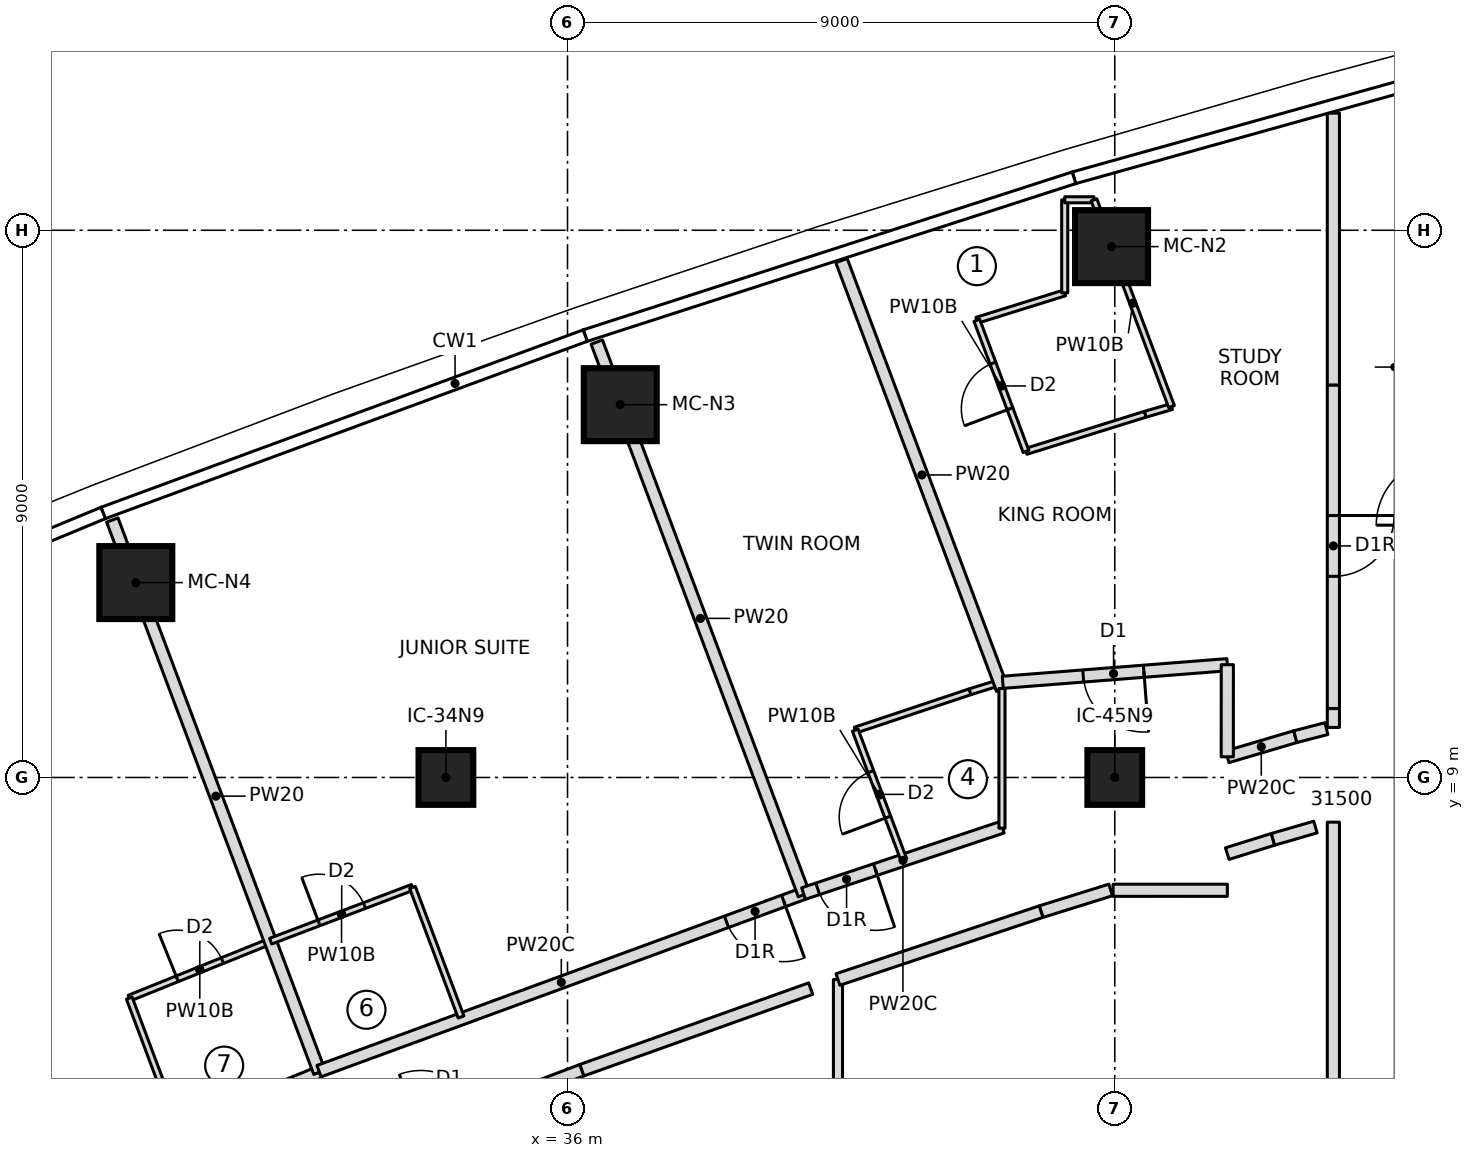
"""IFC4 building model, lengths in metres.
Left out: names, types, materials, properties, quantities, classifications, styles, units other than length and angle.
Written with IfcOpenShell. Run it as: python <this file> out.ifc"""

import sys

from ifc_helpers import new_model, si_unit, direction, frame, frame_2d, origin, origin_2d, place, context, subcontext, project, spatial, rectangle, extrude, element, fill, save


model = new_model("IFC4")
c1 = context("Model", 3, precision=1e-05, world=origin(), true_north=direction((0.0, 1.0)))
c2 = subcontext(c1, "Body", "Model", "MODEL_VIEW")
j1 = project(units=[si_unit("LENGTHUNIT", "METRE"), si_unit("PLANEANGLEUNIT", "RADIAN")], contexts=[c1])
p1 = place(None, origin())
s1 = spatial("IfcSite", under=j1, at=p1, CompositionType="ELEMENT")
p2 = place(p1, origin())
s2 = spatial("IfcBuilding", under=s1, at=p2, CompositionType="ELEMENT")
p3 = place(p2, frame((0.0, 0.0, 220.8)))
s3 = spatial("IfcBuildingStorey", under=s2, at=p3, CompositionType="ELEMENT", Elevation=220.8)
for number, where, z_axis, x_axis in (
    (1, (44.947, 17.731, 0.0), (0.0, 0.0, 1.0), (1.0, 0.0, 0.0)),
    (2, (36.867, 15.132, 0.0), (0.0, 0.0, 1.0), (1.0, 0.0, 0.0)),
    (3, (28.9, 12.205, 0.0), (0.0, 0.0, 1.0), (1.0, 0.0, 0.0)),
):
    element("IfcColumn", number, at=place(p3, frame(where, z_axis=z_axis, x_axis=x_axis)), inside=s3, PredefinedType="COLUMN", context=c2, shape_type="SweptSolid", body=[
        extrude(rectangle(XDim=1.2, YDim=1.2, at=origin_2d()), origin(), (0.0, 0.0, 1.0), 3.55),
    ])
for number, where, z_axis, x_axis in (
    (4, (34.0, 9.0, 0.0), (0.0, 0.0, 1.0), (1.0, 0.0, 0.0)),
    (5, (45.0, 9.0, 0.0), (0.0, 0.0, 1.0), (1.0, 0.0, 0.0)),
):
    element("IfcColumn", number, at=place(p3, frame(where, z_axis=z_axis, x_axis=x_axis)), inside=s3, PredefinedType="COLUMN", context=c2, shape_type="SweptSolid", body=[
        extrude(rectangle(XDim=0.9, YDim=0.9, at=origin_2d()), origin(), (0.0, 0.0, 1.0), 3.55),
    ])
p4 = place(p3, frame((26.266, 1.85, 0.0), z_axis=(0.0, 0.0, 1.0), x_axis=(0.926231512449, 0.376955150311, 0.0)))
e6 = element("IfcWall", 6, at=p4, inside=s3, PredefinedType="PARTITIONING", context=c2, shape_type="SweptSolid", body=[
    extrude(rectangle(XDim=6.105, YDim=0.2, at=frame_2d((3.052, 0.0))), origin(), (0.0, 0.0, 1.0), 3.25),
])
p5 = place(p4, frame((0.35, 0.0, 0.0)))
e7 = element("IfcOpeningElement", 7, at=p5, cuts=e6, PredefinedType="OPENING", context=c2, shape_type="SweptSolid", body=[
    extrude(rectangle(XDim=1.0, YDim=2.1, at=frame_2d((0.5, 1.05))), frame((0.0, 0.11, 0.0), z_axis=(0.0, -1.0, 0.0), x_axis=(1.0, 0.0, 0.0)), (0.0, 0.0, 1.0), 0.22),
])
p6 = place(p3, frame((28.793, 5.372, 0.0), z_axis=(0.0, 0.0, 1.0), x_axis=(0.92761232595, 0.373544338394, 0.0)))
e8 = element("IfcWall", 8, at=p6, inside=s3, PredefinedType="PARTITIONING", context=c2, shape_type="SweptSolid", body=[
    extrude(rectangle(XDim=2.5, YDim=0.1, at=frame_2d((1.25, 0.0))), origin(), (0.0, 0.0, 1.0), 3.25),
])
p7 = place(p6, frame((0.85, 0.0, 0.0)))
e9 = element("IfcOpeningElement", 9, at=p7, cuts=e8, PredefinedType="OPENING", context=c2, shape_type="SweptSolid", body=[
    extrude(rectangle(XDim=0.8, YDim=2.1, at=frame_2d((0.4, 1.05))), frame((0.0, 0.06, 0.0), z_axis=(0.0, -1.0, 0.0), x_axis=(1.0, 0.0, 0.0)), (0.0, 0.0, 1.0), 0.12),
])
p8 = place(p3, frame((29.593, 3.239, 0.0), z_axis=(0.0, 0.0, 1.0), x_axis=(-0.351158682313, 0.936315961541, 0.0)))
e10 = element("IfcWall", 10, at=p8, inside=s3, PredefinedType="PARTITIONING", context=c2, shape_type="SweptSolid", body=[
    extrude(rectangle(XDim=2.278, YDim=0.1, at=frame_2d((1.139, 0.0))), origin(), (0.0, 0.0, 1.0), 3.25),
])
p9 = place(p3, frame((31.92, 4.151, 0.0), z_axis=(0.0, 0.0, 1.0), x_axis=(-0.351126199585, 0.936328143316, 0.0)))
e11 = element("IfcWall", 11, at=p9, inside=s3, PredefinedType="PARTITIONING", context=c2, shape_type="SweptSolid", body=[
    extrude(rectangle(XDim=9.701, YDim=0.2, at=frame_2d((4.851, 0.0))), origin(), (0.0, 0.0, 1.0), 3.25),
])
p10 = place(p3, frame((39.882, 7.091, 0.0), z_axis=(0.0, 0.0, 1.0), x_axis=(-0.938916907106, -0.344143925634, 0.0)))
e12 = element("IfcWall", 12, at=p10, inside=s3, PredefinedType="PARTITIONING", context=c2, shape_type="SweptSolid", body=[
    extrude(rectangle(XDim=8.488, YDim=0.2, at=frame_2d((4.244, 0.0))), origin(), (0.0, 0.0, 1.0), 3.25),
])
p11 = place(p10, frame((0.35, 0.0, 0.0)))
e13 = element("IfcOpeningElement", 13, at=p11, cuts=e12, PredefinedType="OPENING", context=c2, shape_type="SweptSolid", body=[
    extrude(rectangle(XDim=1.0, YDim=2.1, at=frame_2d((0.5, 1.05))), frame((0.0, 0.11, 0.0), z_axis=(0.0, -1.0, 0.0), x_axis=(1.0, 0.0, 0.0)), (0.0, 0.0, 1.0), 0.22),
])
p12 = place(p3, frame((31.117, 6.308, 0.0), z_axis=(0.0, 0.0, 1.0), x_axis=(0.93495051617, 0.354778145202, 0.0)))
e14 = element("IfcWall", 14, at=p12, inside=s3, PredefinedType="PARTITIONING", context=c2, shape_type="SweptSolid", body=[
    extrude(rectangle(XDim=2.495, YDim=0.1, at=frame_2d((1.247, 0.0))), origin(), (0.0, 0.0, 1.0), 3.25),
])
p13 = place(p12, frame((0.85, 0.0, 0.0)))
e15 = element("IfcOpeningElement", 15, at=p13, cuts=e14, PredefinedType="OPENING", context=c2, shape_type="SweptSolid", body=[
    extrude(rectangle(XDim=0.8, YDim=2.1, at=frame_2d((0.4, 1.05))), frame((0.0, 0.06, 0.0), z_axis=(0.0, -1.0, 0.0), x_axis=(1.0, 0.0, 0.0)), (0.0, 0.0, 1.0), 0.12),
])
p14 = place(p3, frame((33.45, 7.193, 0.0), z_axis=(0.0, 0.0, 1.0), x_axis=(0.351135191353, -0.936324771323, 0.0)))
e16 = element("IfcWall", 16, at=p14, inside=s3, PredefinedType="PARTITIONING", context=c2, shape_type="SweptSolid", body=[
    extrude(rectangle(XDim=2.277, YDim=0.1, at=frame_2d((1.139, 0.0))), origin(), (0.0, 0.0, 1.0), 3.25),
])
p15 = place(p3, frame((39.889, 7.072, 0.0), z_axis=(0.0, 0.0, 1.0), x_axis=(-0.35112895446, 0.936327110224, 0.0)))
e17 = element("IfcWall", 17, at=p15, inside=s3, PredefinedType="PARTITIONING", context=c2, shape_type="SweptSolid", body=[
    extrude(rectangle(XDim=9.706, YDim=0.2, at=frame_2d((4.853, 0.0))), origin(), (0.0, 0.0, 1.0), 3.25),
])
p16 = place(p3, frame((43.15, 8.183, 0.0), z_axis=(0.0, 0.0, 1.0), x_axis=(-0.948477584784, -0.316844238013, 0.0)))
e18 = element("IfcWall", 18, at=p16, inside=s3, PredefinedType="PARTITIONING", context=c2, shape_type="SweptSolid", body=[
    extrude(rectangle(XDim=3.445, YDim=0.2, at=frame_2d((1.723, 0.0))), origin(), (0.0, 0.0, 1.0), 3.25),
])
p17 = place(p16, frame((2.2, 0.0, 0.0)))
e19 = element("IfcOpeningElement", 19, at=p17, cuts=e18, PredefinedType="OPENING", context=c2, shape_type="SweptSolid", body=[
    extrude(rectangle(XDim=1.0, YDim=2.1, at=frame_2d((0.5, 1.05))), frame((0.0, 0.11, 0.0), z_axis=(0.0, -1.0, 0.0), x_axis=(1.0, 0.0, 0.0)), (0.0, 0.0, 1.0), 0.22),
])
p18 = place(p3, frame((40.732, 9.779, 0.0), z_axis=(0.0, 0.0, 1.0), x_axis=(0.948499248693, 0.316779379426, 0.0)))
e20 = element("IfcWall", 20, at=p18, inside=s3, PredefinedType="PARTITIONING", context=c2, shape_type="SweptSolid", body=[
    extrude(rectangle(XDim=1.991, YDim=0.1, at=frame_2d((0.996, 0.0))), origin(), (0.0, 0.0, 1.0), 3.25),
])
p19 = place(p3, frame((42.621, 10.409, 0.0), z_axis=(0.0, 0.0, 1.0), x_axis=(0.954624465478, 0.297812239356, 0.0)))
e21 = element("IfcWall", 21, at=p19, inside=s3, PredefinedType="PARTITIONING", context=c2, shape_type="SweptSolid", body=[
    extrude(rectangle(XDim=0.511, YDim=0.1, at=frame_2d((0.255, 0.0))), origin(), (0.0, 0.0, 1.0), 3.25),
])
p20 = place(p3, frame((41.532, 7.645, 0.0), z_axis=(0.0, 0.0, 1.0), x_axis=(-0.351146927505, 0.936320370014, 0.0)))
e22 = element("IfcWall", 22, at=p20, inside=s3, PredefinedType="PARTITIONING", context=c2, shape_type="SweptSolid", body=[
    extrude(rectangle(XDim=2.278, YDim=0.1, at=frame_2d((1.139, 0.0))), origin(), (0.0, 0.0, 1.0), 3.25),
])
p21 = place(p20, frame((0.75, 0.0, 0.0)))
e23 = element("IfcOpeningElement", 23, at=p21, cuts=e22, PredefinedType="OPENING", context=c2, shape_type="SweptSolid", body=[
    extrude(rectangle(XDim=0.8, YDim=2.1, at=frame_2d((0.4, 1.05))), frame((0.0, 0.06, 0.0), z_axis=(0.0, -1.0, 0.0), x_axis=(1.0, 0.0, 0.0)), (0.0, 0.0, 1.0), 0.12),
])
p22 = place(p3, frame((43.15, 10.45, 0.0), z_axis=(0.0, 0.0, 1.0), x_axis=(-0.351119888923, 0.936330509811, 0.0)))
e24 = element("IfcWall", 24, at=p22, inside=s3, PredefinedType="PARTITIONING", context=c2, shape_type="SweptSolid", body=[
    extrude(rectangle(XDim=7.531, YDim=0.2, at=frame_2d((3.766, 0.0))), origin(), (0.0, 0.0, 1.0), 3.25),
])
p23 = place(p3, frame((47.969, 9.671, 0.0), z_axis=(0.0, 0.0, 1.0), x_axis=(-0.958867721668, -0.283853293696, 0.0)))
e25 = element("IfcWall", 25, at=p23, inside=s3, PredefinedType="PARTITIONING", context=c2, shape_type="SweptSolid", body=[
    extrude(rectangle(XDim=1.167, YDim=0.2, at=frame_2d((0.583, 0.0))), origin(), (0.0, 0.0, 1.0), 3.25),
])
p24 = place(p3, frame((42.731, 16.519, 0.0), z_axis=(0.0, 0.0, 1.0), x_axis=(0.954631901927, 0.297788401091, 0.0)))
e26 = element("IfcWall", 26, at=p24, inside=s3, PredefinedType="PARTITIONING", context=c2, shape_type="SweptSolid", body=[
    extrude(rectangle(XDim=1.514, YDim=0.1, at=frame_2d((0.757, 0.0))), origin(), (0.0, 0.0, 1.0), 3.25),
])
p25 = place(p3, frame((44.177, 16.97, 0.0), z_axis=(0.0, 0.0, 1.0), x_axis=(0.0, 1.0, 0.0)))
e27 = element("IfcWall", 27, at=p25, inside=s3, PredefinedType="PARTITIONING", context=c2, shape_type="SweptSolid", body=[
    extrude(rectangle(XDim=1.531, YDim=0.1, at=frame_2d((0.766, 0.0))), origin(), (0.0, 0.0, 1.0), 3.25),
])
p26 = place(p3, frame((44.177, 18.501, 0.0), z_axis=(0.0, 0.0, 1.0), x_axis=(1.0, 0.0, 0.0)))
e28 = element("IfcWall", 28, at=p26, inside=s3, PredefinedType="PARTITIONING", context=c2, shape_type="SweptSolid", body=[
    extrude(rectangle(XDim=0.481, YDim=0.1, at=frame_2d((0.241, 0.0))), origin(), (0.0, 0.0, 1.0), 3.25),
])
p27 = place(p3, frame((45.934, 15.099, 0.0), z_axis=(0.0, 0.0, 1.0), x_axis=(-0.960560469191, -0.278071186978, 0.0)))
e29 = element("IfcWall", 29, at=p27, inside=s3, PredefinedType="PARTITIONING", context=c2, shape_type="SweptSolid", body=[
    extrude(rectangle(XDim=0.452, YDim=0.1, at=frame_2d((0.226, 0.0))), origin(), (0.0, 0.0, 1.0), 3.25),
])
p28 = place(p3, frame((45.499, 14.973, 0.0), z_axis=(0.0, 0.0, 1.0), x_axis=(-0.954642821531, -0.297753393432, 0.0)))
e30 = element("IfcWall", 30, at=p28, inside=s3, PredefinedType="PARTITIONING", context=c2, shape_type="SweptSolid", body=[
    extrude(rectangle(XDim=2.052, YDim=0.1, at=frame_2d((1.026, 0.0))), origin(), (0.0, 0.0, 1.0), 3.25),
])
p29 = place(p3, frame((43.54, 14.362, 0.0), z_axis=(0.0, 0.0, 1.0), x_axis=(-0.351111827312, 0.936333532841, 0.0)))
e31 = element("IfcWall", 31, at=p29, inside=s3, PredefinedType="PARTITIONING", context=c2, shape_type="SweptSolid", body=[
    extrude(rectangle(XDim=2.304, YDim=0.1, at=frame_2d((1.152, 0.0))), origin(), (0.0, 0.0, 1.0), 3.25),
])
p30 = place(p29, frame((0.75, 0.0, 0.0)))
e32 = element("IfcOpeningElement", 32, at=p30, cuts=e31, PredefinedType="OPENING", context=c2, shape_type="SweptSolid", body=[
    extrude(rectangle(XDim=0.8, YDim=2.1, at=frame_2d((0.4, 1.05))), frame((0.0, 0.06, 0.0), z_axis=(0.0, -1.0, 0.0), x_axis=(1.0, 0.0, 0.0)), (0.0, 0.0, 1.0), 0.12),
])
p31 = place(p3, frame((35.556, 3.927, 0.0), z_axis=(0.0, 0.0, 1.0), x_axis=(0.934928414106, 0.354836385533, 0.0)))
e33 = element("IfcWall", 33, at=p31, inside=s3, PredefinedType="PARTITIONING", context=c2, shape_type="SweptSolid", body=[
    extrude(rectangle(XDim=0.727, YDim=0.2, at=frame_2d((0.364, 0.0))), origin(), (0.0, 0.0, 1.0), 3.25),
])
p32 = place(p3, frame((36.236, 4.186, 0.0), z_axis=(0.0, 0.0, 1.0), x_axis=(0.941909090846, 0.335867927288, 0.0)))
e34 = element("IfcWall", 34, at=p32, inside=s3, PredefinedType="PARTITIONING", context=c2, shape_type="SweptSolid", body=[
    extrude(rectangle(XDim=3.995, YDim=0.2, at=frame_2d((1.998, 0.0))), origin(), (0.0, 0.0, 1.0), 3.25),
])
p33 = place(p3, frame((40.448, -5.572, 0.0), z_axis=(0.0, 0.0, 1.0), x_axis=(0.0, 1.0, 0.0)))
e35 = element("IfcWall", 35, at=p33, inside=s3, PredefinedType="PARTITIONING", context=c2, shape_type="SweptSolid", body=[
    extrude(rectangle(XDim=11.249, YDim=0.15, at=frame_2d((5.625, 0.0))), origin(), (0.0, 0.0, 1.0), 3.25),
])
p34 = place(p3, frame((43.788, 6.793, 0.0), z_axis=(0.0, 0.0, 1.0), x_axis=(0.954693570678, 0.29759063511, 0.0)))
e36 = element("IfcWall", 36, at=p34, inside=s3, PredefinedType="PARTITIONING", context=c2, shape_type="SweptSolid", body=[
    extrude(rectangle(XDim=1.198, YDim=0.2, at=frame_2d((0.599, 0.0))), origin(), (0.0, 0.0, 1.0), 3.25),
])
p35 = place(p3, frame((46.85, 7.748, 0.0), z_axis=(0.0, 0.0, 1.0), x_axis=(0.95461224237, 0.297851417181, 0.0)))
e37 = element("IfcWall", 37, at=p35, inside=s3, PredefinedType="PARTITIONING", context=c2, shape_type="SweptSolid", body=[
    extrude(rectangle(XDim=0.788, YDim=0.2, at=frame_2d((0.394, 0.0))), origin(), (0.0, 0.0, 1.0), 3.25),
])
p36 = place(p3, frame((40.448, 5.677, 0.0), z_axis=(0.0, 0.0, 1.0), x_axis=(0.948475139593, 0.316851557632, 0.0)))
e38 = element("IfcWall", 38, at=p36, inside=s3, PredefinedType="PARTITIONING", context=c2, shape_type="SweptSolid", body=[
    extrude(rectangle(XDim=3.522, YDim=0.2, at=frame_2d((1.761, 0.0))), origin(), (0.0, 0.0, 1.0), 3.25),
])
p37 = place(p3, frame((43.145, 10.463, 0.0), z_axis=(0.0, 0.0, 1.0), x_axis=(0.0, -1.0, 0.0)))
e39 = element("IfcWall", 39, at=p37, inside=s3, PredefinedType="PARTITIONING", context=c2, shape_type="SweptSolid", body=[
    extrude(rectangle(XDim=2.298, YDim=0.1, at=frame_2d((1.149, 0.0))), origin(), (0.0, 0.0, 1.0), 3.25),
])
p38 = place(p3, frame((44.658, 18.501, 0.0), z_axis=(0.0, 0.0, 1.0), x_axis=(0.351027709609, -0.936365071479, 0.0)))
e40 = element("IfcWall", 40, at=p38, inside=s3, PredefinedType="PARTITIONING", context=c2, shape_type="SweptSolid", body=[
    extrude(rectangle(XDim=3.633, YDim=0.1, at=frame_2d((1.817, 0.0))), origin(), (0.0, 0.0, 1.0), 3.25),
])
p39 = place(p3, frame((47.602, 7.982, 0.0), z_axis=(0.0, 0.0, 1.0), x_axis=(0.960439023181, 0.278490363839, 0.0)))
e41 = element("IfcWall", 41, at=p39, inside=s3, PredefinedType="PARTITIONING", context=c2, shape_type="SweptSolid", body=[
    extrude(rectangle(XDim=0.727, YDim=0.2, at=frame_2d((0.363, 0.0))), origin(), (0.0, 0.0, 1.0), 3.25),
])
p40 = place(p3, frame((48.595, 15.455, 0.0), z_axis=(0.0, 0.0, 1.0), x_axis=(0.0, -1.0, 0.0)))
e42 = element("IfcWall", 42, at=p40, inside=s3, PredefinedType="PARTITIONING", context=c2, shape_type="SweptSolid", body=[
    extrude(rectangle(XDim=5.322, YDim=0.2, at=frame_2d((2.661, 0.0))), origin(), (0.0, 0.0, 1.0), 3.25),
])
p41 = place(p40, frame((2.147, 0.0, 0.0)))
e43 = element("IfcOpeningElement", 43, at=p41, cuts=e42, PredefinedType="OPENING", context=c2, shape_type="SweptSolid", body=[
    extrude(rectangle(XDim=1.0, YDim=2.1, at=frame_2d((0.5, 1.05))), frame((0.0, 0.11, 0.0), z_axis=(0.0, -1.0, 0.0), x_axis=(1.0, 0.0, 0.0)), (0.0, 0.0, 1.0), 0.22),
])
p42 = place(p3, frame((46.851, 10.855, 0.0), z_axis=(0.0, 0.0, 1.0), x_axis=(-0.996940593543, -0.078162989617, 0.0)))
e44 = element("IfcWall", 44, at=p42, inside=s3, PredefinedType="PARTITIONING", context=c2, shape_type="SweptSolid", body=[
    extrude(rectangle(XDim=3.704, YDim=0.2, at=frame_2d((1.852, 0.0))), origin(), (0.0, 0.0, 1.0), 3.25),
])
p43 = place(p42, frame((1.377, 0.0, 0.0)))
e45 = element("IfcOpeningElement", 45, at=p43, cuts=e44, PredefinedType="OPENING", context=c2, shape_type="SweptSolid", body=[
    extrude(rectangle(XDim=1.0, YDim=2.1, at=frame_2d((0.5, 1.05))), frame((0.0, 0.11, 0.0), z_axis=(0.0, -1.0, 0.0), x_axis=(1.0, 0.0, 0.0)), (0.0, 0.0, 1.0), 0.22),
])
p44 = place(p3, frame((44.972, 7.145, 0.0), z_axis=(0.0, 0.0, 1.0), x_axis=(0.99999999156, 0.000129920747, 0.0)))
e46 = element("IfcWall", 46, at=p44, inside=s3, PredefinedType="PARTITIONING", context=c2, shape_type="SweptSolid", body=[
    extrude(rectangle(XDim=1.879, YDim=0.2, at=frame_2d((0.939, 0.0))), origin(), (0.0, 0.0, 1.0), 3.25),
])
p45 = place(p3, frame((48.595, 8.265, 0.0), z_axis=(0.0, 0.0, 1.0), x_axis=(0.0, -1.0, 0.0)))
e47 = element("IfcWall", 47, at=p45, inside=s3, PredefinedType="PARTITIONING", context=c2, shape_type="SweptSolid", body=[
    extrude(rectangle(XDim=16.53, YDim=0.2, at=frame_2d((8.265, 0.0))), origin(), (0.0, 0.0, 1.0), 3.25),
])
p46 = place(p3, frame((46.85, 9.34, 0.0), z_axis=(0.0, 0.0, 1.0), x_axis=(0.000644641284, 0.999999792219, 0.0)))
e48 = element("IfcWall", 48, at=p46, inside=s3, PredefinedType="PARTITIONING", context=c2, shape_type="SweptSolid", body=[
    extrude(rectangle(XDim=1.515, YDim=0.2, at=frame_2d((0.757, 0.0))), origin(), (0.0, 0.0, 1.0), 3.25),
])
p47 = place(p3, frame((48.595, 19.927, 0.0), z_axis=(0.0, 0.0, 1.0), x_axis=(0.0, -1.0, 0.0)))
e49 = element("IfcWall", 49, at=p47, inside=s3, PredefinedType="PARTITIONING", context=c2, shape_type="SweptSolid", body=[
    extrude(rectangle(XDim=4.472, YDim=0.2, at=frame_2d((2.236, 0.0))), origin(), (0.0, 0.0, 1.0), 3.25),
])
p48 = place(p3, frame((48.595, 10.133, 0.0), z_axis=(0.0, 0.0, 1.0), x_axis=(0.0, -1.0, 0.0)))
e50 = element("IfcWall", 50, at=p48, inside=s3, PredefinedType="PARTITIONING", context=c2, shape_type="SweptSolid", body=[
    extrude(rectangle(XDim=0.31, YDim=0.2, at=frame_2d((0.155, 0.0))), origin(), (0.0, 0.0, 1.0), 3.25),
])
p49 = place(p3, frame((48.48, 9.803, 0.0), z_axis=(0.0, 0.0, 1.0), x_axis=(-0.968262872428, -0.249934011047, 0.0)))
e51 = element("IfcWall", 51, at=p49, inside=s3, PredefinedType="PARTITIONING", context=c2, shape_type="SweptSolid", body=[
    extrude(rectangle(XDim=0.528, YDim=0.2, at=frame_2d((0.264, 0.0))), origin(), (0.0, 0.0, 1.0), 3.25),
])
p50 = place(p7, origin())
e52 = element("IfcDoor", 52, at=p50, inside=s3, OperationType="SINGLE_SWING_LEFT", PredefinedType="DOOR", context=c2, shape_type="SweptSolid", body=[
    extrude(rectangle(XDim=0.8, YDim=2.1, at=frame_2d((0.4, 1.05))), frame((0.0, 0.025, 0.0), z_axis=(0.0, -1.0, 0.0), x_axis=(1.0, 0.0, 0.0)), (0.0, 0.0, 1.0), 0.05),
])
fill(e9, e52)
p51 = place(p13, origin())
e53 = element("IfcDoor", 53, at=p51, inside=s3, OperationType="SINGLE_SWING_LEFT", PredefinedType="DOOR", context=c2, shape_type="SweptSolid", body=[
    extrude(rectangle(XDim=0.8, YDim=2.1, at=frame_2d((0.4, 1.05))), frame((0.0, 0.025, 0.0), z_axis=(0.0, -1.0, 0.0), x_axis=(1.0, 0.0, 0.0)), (0.0, 0.0, 1.0), 0.05),
])
fill(e15, e53)
p52 = place(p11, origin())
e54 = element("IfcDoor", 54, at=p52, inside=s3, OperationType="SINGLE_SWING_RIGHT", PredefinedType="DOOR", context=c2, shape_type="SweptSolid", body=[
    extrude(rectangle(XDim=1.0, YDim=2.1, at=frame_2d((0.5, 1.05))), frame((0.0, 0.025, 0.0), z_axis=(0.0, -1.0, 0.0), x_axis=(1.0, 0.0, 0.0)), (0.0, 0.0, 1.0), 0.05),
])
fill(e13, e54)
p53 = place(p21, origin())
e55 = element("IfcDoor", 55, at=p53, inside=s3, OperationType="SINGLE_SWING_LEFT", PredefinedType="DOOR", context=c2, shape_type="SweptSolid", body=[
    extrude(rectangle(XDim=0.8, YDim=2.1, at=frame_2d((0.4, 1.05))), frame((0.0, 0.025, 0.0), z_axis=(0.0, -1.0, 0.0), x_axis=(1.0, 0.0, 0.0)), (0.0, 0.0, 1.0), 0.05),
])
fill(e23, e55)
p54 = place(p17, origin())
e56 = element("IfcDoor", 56, at=p54, inside=s3, OperationType="SINGLE_SWING_RIGHT", PredefinedType="DOOR", context=c2, shape_type="SweptSolid", body=[
    extrude(rectangle(XDim=1.0, YDim=2.1, at=frame_2d((0.5, 1.05))), frame((0.0, 0.025, 0.0), z_axis=(0.0, -1.0, 0.0), x_axis=(1.0, 0.0, 0.0)), (0.0, 0.0, 1.0), 0.05),
])
fill(e19, e56)
p55 = place(p30, origin())
e57 = element("IfcDoor", 57, at=p55, inside=s3, OperationType="SINGLE_SWING_LEFT", PredefinedType="DOOR", context=c2, shape_type="SweptSolid", body=[
    extrude(rectangle(XDim=0.8, YDim=2.1, at=frame_2d((0.4, 1.05))), frame((0.0, 0.025, 0.0), z_axis=(0.0, -1.0, 0.0), x_axis=(1.0, 0.0, 0.0)), (0.0, 0.0, 1.0), 0.05),
])
fill(e32, e57)
p56 = place(p41, origin())
e58 = element("IfcDoor", 58, at=p56, inside=s3, OperationType="SINGLE_SWING_RIGHT", PredefinedType="DOOR", context=c2, shape_type="SweptSolid", body=[
    extrude(rectangle(XDim=1.0, YDim=2.1, at=frame_2d((0.5, 1.05))), frame((0.0, 0.025, 0.0), z_axis=(0.0, -1.0, 0.0), x_axis=(1.0, 0.0, 0.0)), (0.0, 0.0, 1.0), 0.05),
])
fill(e43, e58)
p57 = place(p43, origin())
e59 = element("IfcDoor", 59, at=p57, inside=s3, OperationType="SINGLE_SWING_LEFT", PredefinedType="DOOR", context=c2, shape_type="SweptSolid", body=[
    extrude(rectangle(XDim=1.0, YDim=2.1, at=frame_2d((0.5, 1.05))), frame((0.0, 0.025, 0.0), z_axis=(0.0, -1.0, 0.0), x_axis=(1.0, 0.0, 0.0)), (0.0, 0.0, 1.0), 0.05),
])
fill(e45, e59)
save(model, sys.argv[1])
